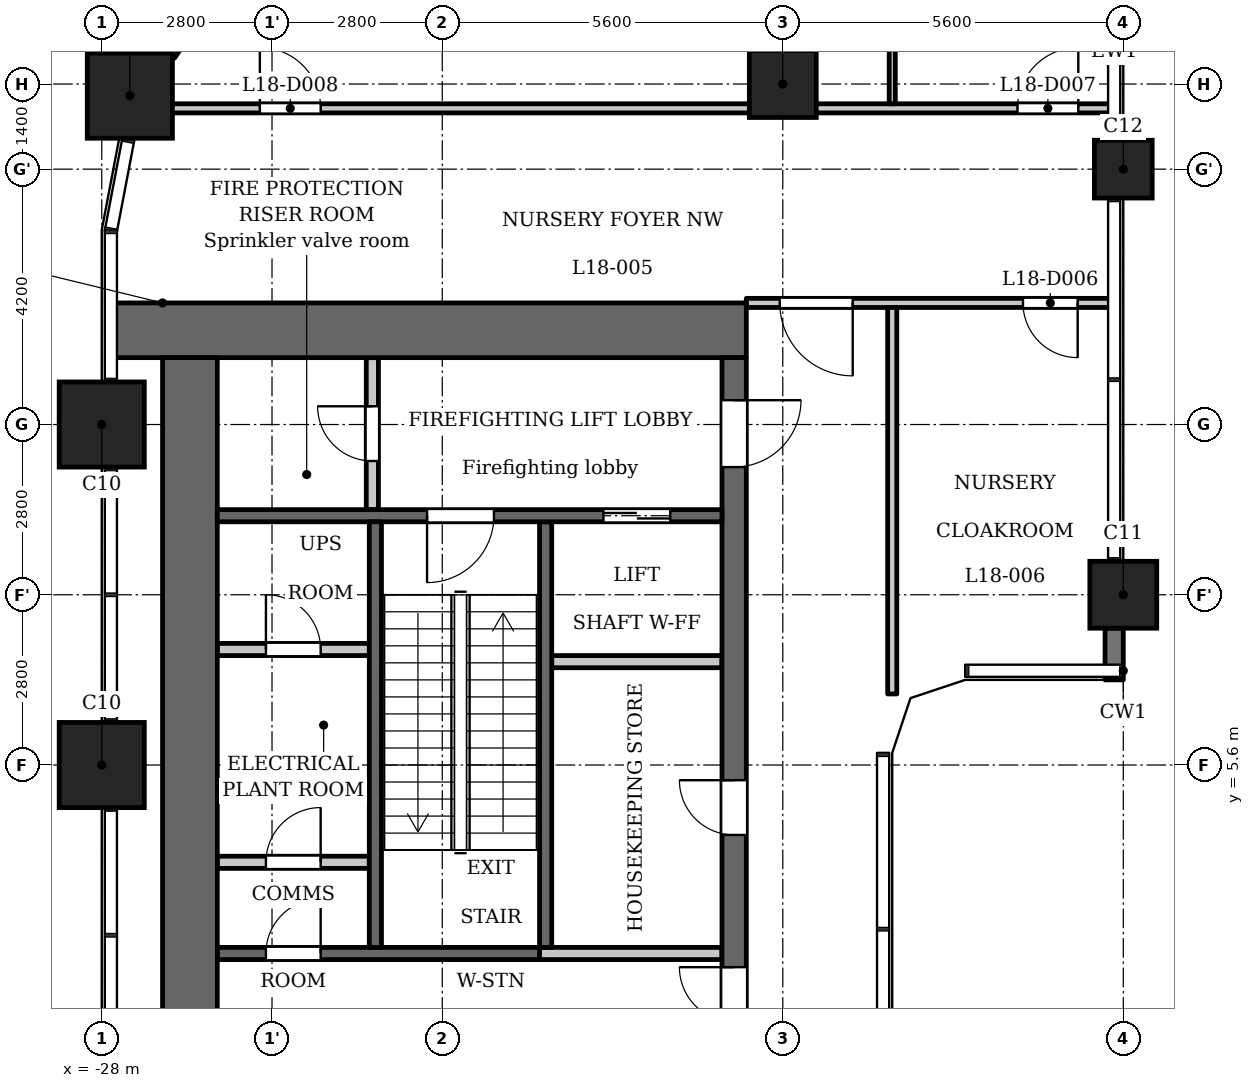
"""IFC4 building model, lengths in metres.
Left out: names, types, materials, properties, quantities, classifications, styles, units other than length and angle.
Written with IfcOpenShell. Run it as: python <this file> out.ifc"""

import sys

from ifc_helpers import new_model, si_unit, direction, frame, frame_2d, origin, origin_2d, place, context, subcontext, project, spatial, polyline, rectangle, outline, extrude, element, fill, save


model = new_model("IFC4")
c1 = context("Model", 3, precision=1e-05, world=origin(), true_north=direction((0.0, 1.0)))
c2 = subcontext(c1, "Body", "Model", "MODEL_VIEW")
j1 = project(units=[si_unit("LENGTHUNIT", "METRE"), si_unit("PLANEANGLEUNIT", "RADIAN")], contexts=[c1])
p1 = place(None, origin())
s1 = spatial("IfcSite", under=j1, at=p1, CompositionType="ELEMENT")
p2 = place(p1, origin())
s2 = spatial("IfcBuilding", under=s1, at=p2, CompositionType="ELEMENT")
p3 = place(p2, frame((0.0, 0.0, 72.5)))
s3 = spatial("IfcBuildingStorey", under=s2, at=p3, CompositionType="ELEMENT", Elevation=72.5)
for number, where, z_axis, x_axis in (
    (1, (-27.538, 16.609, 0.0), (0.0, 0.0, 1.0), (1.0, 0.0, 0.0)),
    (2, (-28.0, 11.2, 0.0), (0.0, 0.0, 1.0), (1.0, 0.0, 0.0)),
    (3, (-28.0, 5.6, 0.0), (0.0, 0.0, 1.0), (1.0, 0.0, 0.0)),
):
    element("IfcColumn", number, at=place(p3, frame(where, z_axis=z_axis, x_axis=x_axis)), inside=s3, PredefinedType="COLUMN", context=c2, shape_type="SweptSolid", body=[
        extrude(rectangle(XDim=1.4, YDim=1.4, at=origin_2d()), origin(), (0.0, 0.0, 1.0), 5.4),
    ])
for number, where, z_axis, x_axis in (
    (4, (-16.8, 16.8, 0.0), (0.0, 0.0, 1.0), (1.0, 0.0, 0.0)),
    (5, (-11.2, 8.4, 0.0), (0.0, 0.0, 1.0), (1.0, 0.0, 0.0)),
):
    element("IfcColumn", number, at=place(p3, frame(where, z_axis=z_axis, x_axis=x_axis)), inside=s3, PredefinedType="COLUMN", context=c2, shape_type="SweptSolid", body=[
        extrude(rectangle(XDim=1.1, YDim=1.1, at=origin_2d()), origin(), (0.0, 0.0, 1.0), 5.4),
    ])
p4 = place(p3, frame((-11.2, 15.4, 0.0), z_axis=(0.0, 0.0, 1.0), x_axis=(1.0, 0.0, 0.0)))
e6 = element("IfcColumn", 6, at=p4, inside=s3, PredefinedType="COLUMN", context=c2, shape_type="SweptSolid", body=[
    extrude(rectangle(XDim=0.95, YDim=0.95, at=origin_2d()), origin(), (0.0, 0.0, 1.0), 5.4),
])
p5 = place(p3, frame((-11.35, 7.0, 0.0), z_axis=(0.0, 0.0, 1.0), x_axis=(0.0, 1.0, 0.0)))
e7 = element("IfcWall", 7, at=p5, inside=s3, PredefinedType="SOLIDWALL", context=c2, shape_type="SweptSolid", body=[
    extrude(rectangle(XDim=0.85, YDim=0.3, at=frame_2d((0.425, 0.0))), origin(), (0.0, 0.0, 1.0), 4.95),
])
p6 = place(p3, frame((-26.636, 17.74, 0.0), z_axis=(0.0, 0.0, 1.0), x_axis=(-0.561913238827, -0.827196175059, 0.0)))
e8 = element("IfcWall", 8, at=p6, inside=s3, PredefinedType="SOLIDWALL", context=c2, shape_type="SweptSolid", body=[
    extrude(rectangle(XDim=0.522, YDim=0.3, at=frame_2d((0.261, 0.0))), origin(), (0.0, 0.0, 1.0), 4.95),
])
p7 = place(p3, frame((-20.7, 2.6, 0.0), z_axis=(0.0, 0.0, 1.0), x_axis=(0.0, 1.0, 0.0)))
e9 = element("IfcWall", 9, at=p7, inside=s3, PredefinedType="SHEAR", context=c2, shape_type="SweptSolid", body=[
    extrude(rectangle(XDim=7.0, YDim=0.2, at=frame_2d((3.5, 0.0))), origin(), (0.0, 0.0, 1.0), 4.95),
])
p8 = place(p3, frame((-20.8, 2.5, 0.0), z_axis=(0.0, 0.0, 1.0), x_axis=(-1.0, 0.0, 0.0)))
e10 = element("IfcWall", 10, at=p8, inside=s3, PredefinedType="SHEAR", context=c2, shape_type="SweptSolid", body=[
    extrude(rectangle(XDim=5.3, YDim=0.2, at=frame_2d((2.65, 0.0))), origin(), (0.0, 0.0, 1.0), 4.95),
])
p9 = place(p8, frame((3.6, 0.0, 0.0)))
e11 = element("IfcOpeningElement", 11, at=p9, cuts=e10, PredefinedType="OPENING", context=c2, shape_type="SweptSolid", body=[
    extrude(rectangle(XDim=0.9, YDim=2.1, at=frame_2d((0.45, 1.05))), frame((0.0, 0.11, 0.0), z_axis=(0.0, -1.0, 0.0), x_axis=(1.0, 0.0, 0.0)), (0.0, 0.0, 1.0), 0.22),
])
p10 = place(p3, frame((-17.4, 12.75, 0.0), z_axis=(0.0, 0.0, 1.0), x_axis=(-1.0, 0.0, 0.0)))
e12 = element("IfcWall", 12, at=p10, inside=s3, PredefinedType="SHEAR", context=c2, shape_type="SweptSolid", body=[
    extrude(rectangle(XDim=10.4, YDim=0.9, at=frame_2d((5.2, 0.0))), origin(), (0.0, 0.0, 1.0), 4.95),
])
p11 = place(p3, frame((-17.6, -12.3, 0.0), z_axis=(0.0, 0.0, 1.0), x_axis=(0.0, 1.0, 0.0)))
e13 = element("IfcWall", 13, at=p11, inside=s3, PredefinedType="SHEAR", context=c2, shape_type="SweptSolid", body=[
    extrude(rectangle(XDim=24.6, YDim=0.4, at=frame_2d((12.3, 0.0))), origin(), (0.0, 0.0, 1.0), 4.95),
])
p12 = place(p11, frame((6.0, 0.0, 0.0)))
e14 = element("IfcOpeningElement", 14, at=p12, cuts=e13, PredefinedType="OPENING", context=c2, shape_type="SweptSolid", body=[
    extrude(rectangle(XDim=1.1, YDim=2.1, at=frame_2d((0.55, 1.05))), frame((0.0, 0.21, 0.0), z_axis=(0.0, -1.0, 0.0), x_axis=(1.0, 0.0, 0.0)), (0.0, 0.0, 1.0), 0.42),
])
p13 = place(p11, frame((8.4, 0.0, 0.0)))
e15 = element("IfcOpeningElement", 15, at=p13, cuts=e13, PredefinedType="OPENING", context=c2, shape_type="SweptSolid", body=[
    extrude(rectangle(XDim=1.1, YDim=2.1, at=frame_2d((0.55, 1.05))), frame((0.0, 0.21, 0.0), z_axis=(0.0, -1.0, 0.0), x_axis=(1.0, 0.0, 0.0)), (0.0, 0.0, 1.0), 0.42),
])
p14 = place(p11, frame((10.8, 0.0, 0.0)))
e16 = element("IfcOpeningElement", 16, at=p14, cuts=e13, PredefinedType="OPENING", context=c2, shape_type="SweptSolid", body=[
    extrude(rectangle(XDim=1.1, YDim=2.1, at=frame_2d((0.55, 1.05))), frame((0.0, 0.21, 0.0), z_axis=(0.0, -1.0, 0.0), x_axis=(1.0, 0.0, 0.0)), (0.0, 0.0, 1.0), 0.42),
])
p15 = place(p11, frame((16.75, 0.0, 0.0)))
e17 = element("IfcOpeningElement", 17, at=p15, cuts=e13, PredefinedType="OPENING", context=c2, shape_type="SweptSolid", body=[
    extrude(rectangle(XDim=0.9, YDim=2.1, at=frame_2d((0.45, 1.05))), frame((0.0, 0.21, 0.0), z_axis=(0.0, -1.0, 0.0), x_axis=(1.0, 0.0, 0.0)), (0.0, 0.0, 1.0), 0.42),
])
p16 = place(p11, frame((22.8, 0.0, 0.0)))
e18 = element("IfcOpeningElement", 18, at=p16, cuts=e13, PredefinedType="OPENING", context=c2, shape_type="SweptSolid", body=[
    extrude(rectangle(XDim=1.1, YDim=2.1, at=frame_2d((0.55, 1.05))), frame((0.0, 0.21, 0.0), z_axis=(0.0, -1.0, 0.0), x_axis=(1.0, 0.0, 0.0)), (0.0, 0.0, 1.0), 0.42),
])
p17 = place(p11, frame((0.7, 0.0, 0.0)))
e19 = element("IfcOpeningElement", 19, at=p17, cuts=e13, PredefinedType="OPENING", context=c2, shape_type="SweptSolid", body=[
    extrude(rectangle(XDim=1.1, YDim=2.1, at=frame_2d((0.55, 1.05))), frame((0.0, 0.21, 0.0), z_axis=(0.0, -1.0, 0.0), x_axis=(1.0, 0.0, 0.0)), (0.0, 0.0, 1.0), 0.42),
])
p18 = place(p11, frame((12.775, 0.0, 0.0)))
e20 = element("IfcOpeningElement", 20, at=p18, cuts=e13, PredefinedType="OPENING", context=c2, shape_type="SweptSolid", body=[
    extrude(rectangle(XDim=1.8, YDim=2.1, at=frame_2d((0.9, 1.05))), frame((0.0, 0.21, 0.0), z_axis=(0.0, -1.0, 0.0), x_axis=(1.0, 0.0, 0.0)), (0.0, 0.0, 1.0), 0.42),
])
p19 = place(p3, frame((-26.55, -12.3, 0.0), z_axis=(0.0, 0.0, 1.0), x_axis=(0.0, 1.0, 0.0)))
e21 = element("IfcWall", 21, at=p19, inside=s3, PredefinedType="SHEAR", context=c2, shape_type="SweptSolid", body=[
    extrude(rectangle(XDim=24.6, YDim=0.9, at=frame_2d((12.3, 0.0))), origin(), (0.0, 0.0, 1.0), 4.95),
])
p20 = place(p3, frame((-23.55, 9.8, 0.0), z_axis=(0.0, 0.0, 1.0), x_axis=(0.0, 1.0, 0.0)))
e22 = element("IfcWall", 22, at=p20, inside=s3, PredefinedType="PARTITIONING", context=c2, shape_type="SweptSolid", body=[
    extrude(rectangle(XDim=2.5, YDim=0.2, at=frame_2d((1.25, 0.0))), origin(), (0.0, 0.0, 1.0), 4.95),
])
p21 = place(p20, frame((0.8, 0.0, 0.0)))
e23 = element("IfcOpeningElement", 23, at=p21, cuts=e22, PredefinedType="OPENING", context=c2, shape_type="SweptSolid", body=[
    extrude(rectangle(XDim=0.9, YDim=2.1, at=frame_2d((0.45, 1.05))), frame((0.0, 0.11, 0.0), z_axis=(0.0, -1.0, 0.0), x_axis=(1.0, 0.0, 0.0)), (0.0, 0.0, 1.0), 0.22),
])
p22 = place(p3, frame((-23.6, 4.0, 0.0), z_axis=(0.0, 0.0, 1.0), x_axis=(-1.0, 0.0, 0.0)))
e24 = element("IfcWall", 24, at=p22, inside=s3, PredefinedType="PARTITIONING", context=c2, shape_type="SweptSolid", body=[
    extrude(rectangle(XDim=2.5, YDim=0.2, at=frame_2d((1.25, 0.0))), origin(), (0.0, 0.0, 1.0), 4.95),
])
p23 = place(p22, frame((0.8, 0.0, 0.0)))
e25 = element("IfcOpeningElement", 25, at=p23, cuts=e24, PredefinedType="OPENING", context=c2, shape_type="SweptSolid", body=[
    extrude(rectangle(XDim=0.9, YDim=2.1, at=frame_2d((0.45, 1.05))), frame((0.0, 0.11, 0.0), z_axis=(0.0, -1.0, 0.0), x_axis=(1.0, 0.0, 0.0)), (0.0, 0.0, 1.0), 0.22),
])
p24 = place(p3, frame((-23.6, 7.5, 0.0), z_axis=(0.0, 0.0, 1.0), x_axis=(-1.0, 0.0, 0.0)))
e26 = element("IfcWall", 26, at=p24, inside=s3, PredefinedType="PARTITIONING", context=c2, shape_type="SweptSolid", body=[
    extrude(rectangle(XDim=2.5, YDim=0.2, at=frame_2d((1.25, 0.0))), origin(), (0.0, 0.0, 1.0), 4.95),
])
p25 = place(p24, frame((0.8, 0.0, 0.0)))
e27 = element("IfcOpeningElement", 27, at=p25, cuts=e26, PredefinedType="OPENING", context=c2, shape_type="SweptSolid", body=[
    extrude(rectangle(XDim=0.9, YDim=2.1, at=frame_2d((0.45, 1.05))), frame((0.0, 0.11, 0.0), z_axis=(0.0, -1.0, 0.0), x_axis=(1.0, 0.0, 0.0)), (0.0, 0.0, 1.0), 0.22),
])
p26 = place(p3, frame((-17.8, 2.5, 0.0), z_axis=(0.0, 0.0, 1.0), x_axis=(-1.0, 0.0, 0.0)))
e28 = element("IfcWall", 28, at=p26, inside=s3, PredefinedType="PARTITIONING", context=c2, shape_type="SweptSolid", body=[
    extrude(rectangle(XDim=3.0, YDim=0.2, at=frame_2d((1.5, 0.0))), origin(), (0.0, 0.0, 1.0), 4.95),
])
p27 = place(p3, frame((-17.8, 7.3, 0.0), z_axis=(0.0, 0.0, 1.0), x_axis=(-1.0, 0.0, 0.0)))
e29 = element("IfcWall", 29, at=p27, inside=s3, PredefinedType="PARTITIONING", context=c2, shape_type="SweptSolid", body=[
    extrude(rectangle(XDim=2.8, YDim=0.2, at=frame_2d((1.4, 0.0))), origin(), (0.0, 0.0, 1.0), 4.95),
])
p28 = place(p3, frame((-17.8, 9.7, 0.0), z_axis=(0.0, 0.0, 1.0), x_axis=(-1.0, 0.0, 0.0)))
e30 = element("IfcWall", 30, at=p28, inside=s3, PredefinedType="SHEAR", context=c2, shape_type="SweptSolid", body=[
    extrude(rectangle(XDim=8.3, YDim=0.2, at=frame_2d((4.15, 0.0))), origin(), (0.0, 0.0, 1.0), 4.95),
])
p29 = place(p28, frame((0.85, 0.0, 0.0)))
e31 = element("IfcOpeningElement", 31, at=p29, cuts=e30, PredefinedType="OPENING", context=c2, shape_type="SweptSolid", body=[
    extrude(rectangle(XDim=1.1, YDim=2.1, at=frame_2d((0.55, 1.05))), frame((0.0, 0.11, 0.0), z_axis=(0.0, -1.0, 0.0), x_axis=(1.0, 0.0, 0.0)), (0.0, 0.0, 1.0), 0.22),
])
p30 = place(p28, frame((3.75, 0.0, 0.0)))
e32 = element("IfcOpeningElement", 32, at=p30, cuts=e30, PredefinedType="OPENING", context=c2, shape_type="SweptSolid", body=[
    extrude(rectangle(XDim=1.1, YDim=2.1, at=frame_2d((0.55, 1.05))), frame((0.0, 0.11, 0.0), z_axis=(0.0, -1.0, 0.0), x_axis=(1.0, 0.0, 0.0)), (0.0, 0.0, 1.0), 0.22),
])
p31 = place(p3, frame((-23.5, 2.6, 0.0), z_axis=(0.0, 0.0, 1.0), x_axis=(0.0, 1.0, 0.0)))
e33 = element("IfcWall", 33, at=p31, inside=s3, PredefinedType="SHEAR", context=c2, shape_type="SweptSolid", body=[
    extrude(rectangle(XDim=7.0, YDim=0.2, at=frame_2d((3.5, 0.0))), origin(), (0.0, 0.0, 1.0), 4.95),
])
p32 = place(p3, frame((-17.4, 13.2, 0.0), z_axis=(0.0, 0.0, 1.0), x_axis=(1.0, 0.0, 0.0)))
e34 = element("IfcWall", 34, at=p32, inside=s3, PredefinedType="PARTITIONING", context=c2, shape_type="SweptSolid", body=[
    extrude(rectangle(XDim=6.016, YDim=0.15, at=frame_2d((3.008, 0.0))), origin(), (0.0, 0.0, 1.0), 4.95),
])
p33 = place(p32, frame((0.55, 0.0, 0.0)))
e35 = element("IfcOpeningElement", 35, at=p33, cuts=e34, PredefinedType="OPENING", context=c2, shape_type="SweptSolid", body=[
    extrude(rectangle(XDim=1.2, YDim=2.1, at=frame_2d((0.6, 1.05))), frame((0.0, 0.085, 0.0), z_axis=(0.0, -1.0, 0.0), x_axis=(1.0, 0.0, 0.0)), (0.0, 0.0, 1.0), 0.17),
])
p34 = place(p32, frame((4.55, 0.0, 0.0)))
e36 = element("IfcOpeningElement", 36, at=p34, cuts=e34, PredefinedType="OPENING", context=c2, shape_type="SweptSolid", body=[
    extrude(rectangle(XDim=0.9, YDim=2.1, at=frame_2d((0.45, 1.05))), frame((0.0, 0.085, 0.0), z_axis=(0.0, -1.0, 0.0), x_axis=(1.0, 0.0, 0.0)), (0.0, 0.0, 1.0), 0.17),
])
p35 = place(p3, frame((-27.52, 16.4, 0.0), z_axis=(0.0, 0.0, 1.0), x_axis=(1.0, 0.0, 0.0)))
e37 = element("IfcWall", 37, at=p35, inside=s3, PredefinedType="PARTITIONING", context=c2, shape_type="SweptSolid", body=[
    extrude(rectangle(XDim=16.136, YDim=0.15, at=frame_2d((8.068, 0.0))), origin(), (0.0, 0.0, 1.0), 4.95),
])
p36 = place(p35, frame((14.58, 0.0, 0.0)))
e38 = element("IfcOpeningElement", 38, at=p36, cuts=e37, PredefinedType="OPENING", context=c2, shape_type="SweptSolid", body=[
    extrude(rectangle(XDim=1.0, YDim=2.1, at=frame_2d((0.5, 1.05))), frame((0.0, 0.085, 0.0), z_axis=(0.0, -1.0, 0.0), x_axis=(1.0, 0.0, 0.0)), (0.0, 0.0, 1.0), 0.17),
])
p37 = place(p35, frame((2.12, 0.0, 0.0)))
e39 = element("IfcOpeningElement", 39, at=p37, cuts=e37, PredefinedType="OPENING", context=c2, shape_type="SweptSolid", body=[
    extrude(rectangle(XDim=1.0, YDim=2.1, at=frame_2d((0.5, 1.05))), frame((0.0, 0.085, 0.0), z_axis=(0.0, -1.0, 0.0), x_axis=(1.0, 0.0, 0.0)), (0.0, 0.0, 1.0), 0.17),
])
p38 = place(p3, frame((-15.0, 16.475, 0.0), z_axis=(0.0, 0.0, 1.0), x_axis=(0.0, 1.0, 0.0)))
e40 = element("IfcWall", 40, at=p38, inside=s3, PredefinedType="PARTITIONING", context=c2, shape_type="SweptSolid", body=[
    extrude(rectangle(XDim=5.741, YDim=0.1, at=frame_2d((2.871, 0.0))), origin(), (0.0, 0.0, 1.0), 4.95),
])
p39 = place(p3, frame((-15.0, 6.769, 0.0), z_axis=(0.0, 0.0, 1.0), x_axis=(0.0, 1.0, 0.0)))
e41 = element("IfcWall", 41, at=p39, inside=s3, PredefinedType="PARTITIONING", context=c2, shape_type="SweptSolid", body=[
    extrude(rectangle(XDim=6.356, YDim=0.15, at=frame_2d((3.178, 0.0))), origin(), (0.0, 0.0, 1.0), 4.95),
])
p40 = place(p3, origin())
e42 = element("IfcWall", 42, at=p40, inside=s3, PredefinedType="SOLIDWALL", context=c2, shape_type="SweptSolid", body=[
    extrude(outline(polyline([(-15.0, 5.8), (-14.7, 6.7), (-13.8, 7.0), (-13.8, 7.3), (-13.849, 7.3), (-14.937, 6.937), (-15.3, 5.849), (-15.3, 5.8), (-15.0, 5.8)])), origin(), (0.0, 0.0, 1.0), 4.95),
])
p41 = place(p15, origin())
e43 = element("IfcDoor", 43, at=p41, inside=s3, OperationType="SINGLE_SWING_LEFT", PredefinedType="DOOR", context=c2, shape_type="SweptSolid", body=[
    extrude(rectangle(XDim=0.9, YDim=2.1, at=frame_2d((0.45, 1.05))), frame((0.0, 0.025, 0.0), z_axis=(0.0, -1.0, 0.0), x_axis=(1.0, 0.0, 0.0)), (0.0, 0.0, 1.0), 0.05),
])
fill(e17, e43)
p42 = place(p29, origin())
e44 = element("IfcDoor", 44, at=p42, inside=s3, OperationType="DOUBLE_DOOR_SLIDING", PredefinedType="DOOR", context=c2, shape_type="SweptSolid", body=[
    extrude(rectangle(XDim=1.1, YDim=2.1, at=frame_2d((0.55, 1.05))), frame((0.0, 0.025, 0.0), z_axis=(0.0, -1.0, 0.0), x_axis=(1.0, 0.0, 0.0)), (0.0, 0.0, 1.0), 0.05),
])
fill(e31, e44)
p43 = place(p16, origin())
e45 = element("IfcDoor", 45, at=p43, inside=s3, OperationType="SINGLE_SWING_RIGHT", PredefinedType="DOOR", context=c2, shape_type="SweptSolid", body=[
    extrude(rectangle(XDim=1.1, YDim=2.1, at=frame_2d((0.55, 1.05))), frame((0.0, 0.025, 0.0), z_axis=(0.0, -1.0, 0.0), x_axis=(1.0, 0.0, 0.0)), (0.0, 0.0, 1.0), 0.05),
])
fill(e18, e45)
p44 = place(p21, origin())
e46 = element("IfcDoor", 46, at=p44, inside=s3, OperationType="SINGLE_SWING_LEFT", PredefinedType="DOOR", context=c2, shape_type="SweptSolid", body=[
    extrude(rectangle(XDim=0.9, YDim=2.1, at=frame_2d((0.45, 1.05))), frame((0.0, 0.025, 0.0), z_axis=(0.0, -1.0, 0.0), x_axis=(1.0, 0.0, 0.0)), (0.0, 0.0, 1.0), 0.05),
])
fill(e23, e46)
p45 = place(p30, origin())
e47 = element("IfcDoor", 47, at=p45, inside=s3, OperationType="SINGLE_SWING_LEFT", PredefinedType="DOOR", context=c2, shape_type="SweptSolid", body=[
    extrude(rectangle(XDim=1.1, YDim=2.1, at=frame_2d((0.55, 1.05))), frame((0.0, 0.025, 0.0), z_axis=(0.0, -1.0, 0.0), x_axis=(1.0, 0.0, 0.0)), (0.0, 0.0, 1.0), 0.05),
])
fill(e32, e47)
p46 = place(p18, origin())
e48 = element("IfcDoor", 48, at=p46, inside=s3, OperationType="DOUBLE_DOOR_SINGLE_SWING", PredefinedType="DOOR", context=c2, shape_type="SweptSolid", body=[
    extrude(rectangle(XDim=1.8, YDim=2.1, at=frame_2d((0.9, 1.05))), frame((0.0, 0.025, 0.0), z_axis=(0.0, -1.0, 0.0), x_axis=(1.0, 0.0, 0.0)), (0.0, 0.0, 1.0), 0.05),
])
fill(e20, e48)
p47 = place(p23, origin())
e49 = element("IfcDoor", 49, at=p47, inside=s3, OperationType="SINGLE_SWING_LEFT", PredefinedType="DOOR", context=c2, shape_type="SweptSolid", body=[
    extrude(rectangle(XDim=0.9, YDim=2.1, at=frame_2d((0.45, 1.05))), frame((0.0, 0.025, 0.0), z_axis=(0.0, -1.0, 0.0), x_axis=(1.0, 0.0, 0.0)), (0.0, 0.0, 1.0), 0.05),
])
fill(e25, e49)
p48 = place(p25, origin())
e50 = element("IfcDoor", 50, at=p48, inside=s3, OperationType="SINGLE_SWING_RIGHT", PredefinedType="DOOR", context=c2, shape_type="SweptSolid", body=[
    extrude(rectangle(XDim=0.9, YDim=2.1, at=frame_2d((0.45, 1.05))), frame((0.0, 0.025, 0.0), z_axis=(0.0, -1.0, 0.0), x_axis=(1.0, 0.0, 0.0)), (0.0, 0.0, 1.0), 0.05),
])
fill(e27, e50)
p49 = place(p9, origin())
e51 = element("IfcDoor", 51, at=p49, inside=s3, OperationType="SINGLE_SWING_LEFT", PredefinedType="DOOR", context=c2, shape_type="SweptSolid", body=[
    extrude(rectangle(XDim=0.9, YDim=2.1, at=frame_2d((0.45, 1.05))), frame((0.0, 0.025, 0.0), z_axis=(0.0, -1.0, 0.0), x_axis=(1.0, 0.0, 0.0)), (0.0, 0.0, 1.0), 0.05),
])
fill(e11, e51)
p50 = place(p33, origin())
e52 = element("IfcDoor", 52, at=p50, inside=s3, OperationType="SINGLE_SWING_RIGHT", PredefinedType="DOOR", context=c2, shape_type="SweptSolid", body=[
    extrude(rectangle(XDim=1.2, YDim=2.1, at=frame_2d((0.6, 1.05))), frame((0.0, 0.025, 0.0), z_axis=(0.0, -1.0, 0.0), x_axis=(1.0, 0.0, 0.0)), (0.0, 0.0, 1.0), 0.05),
])
fill(e35, e52)
p51 = place(p34, origin())
e53 = element("IfcDoor", 53, at=p51, inside=s3, OperationType="SINGLE_SWING_RIGHT", PredefinedType="DOOR", context=c2, shape_type="SweptSolid", body=[
    extrude(rectangle(XDim=0.9, YDim=2.1, at=frame_2d((0.45, 1.05))), frame((0.0, 0.025, 0.0), z_axis=(0.0, -1.0, 0.0), x_axis=(1.0, 0.0, 0.0)), (0.0, 0.0, 1.0), 0.05),
])
fill(e36, e53)
p52 = place(p36, origin())
e54 = element("IfcDoor", 54, at=p52, inside=s3, OperationType="SINGLE_SWING_LEFT", PredefinedType="DOOR", context=c2, shape_type="SweptSolid", body=[
    extrude(rectangle(XDim=1.0, YDim=2.1, at=frame_2d((0.5, 1.05))), frame((0.0, 0.025, 0.0), z_axis=(0.0, -1.0, 0.0), x_axis=(1.0, 0.0, 0.0)), (0.0, 0.0, 1.0), 0.05),
])
fill(e38, e54)
p53 = place(p37, origin())
e55 = element("IfcDoor", 55, at=p53, inside=s3, OperationType="SINGLE_SWING_RIGHT", PredefinedType="DOOR", context=c2, shape_type="SweptSolid", body=[
    extrude(rectangle(XDim=1.0, YDim=2.1, at=frame_2d((0.5, 1.05))), frame((0.0, 0.025, 0.0), z_axis=(0.0, -1.0, 0.0), x_axis=(1.0, 0.0, 0.0)), (0.0, 0.0, 1.0), 0.05),
])
fill(e39, e55)
save(model, sys.argv[1])
